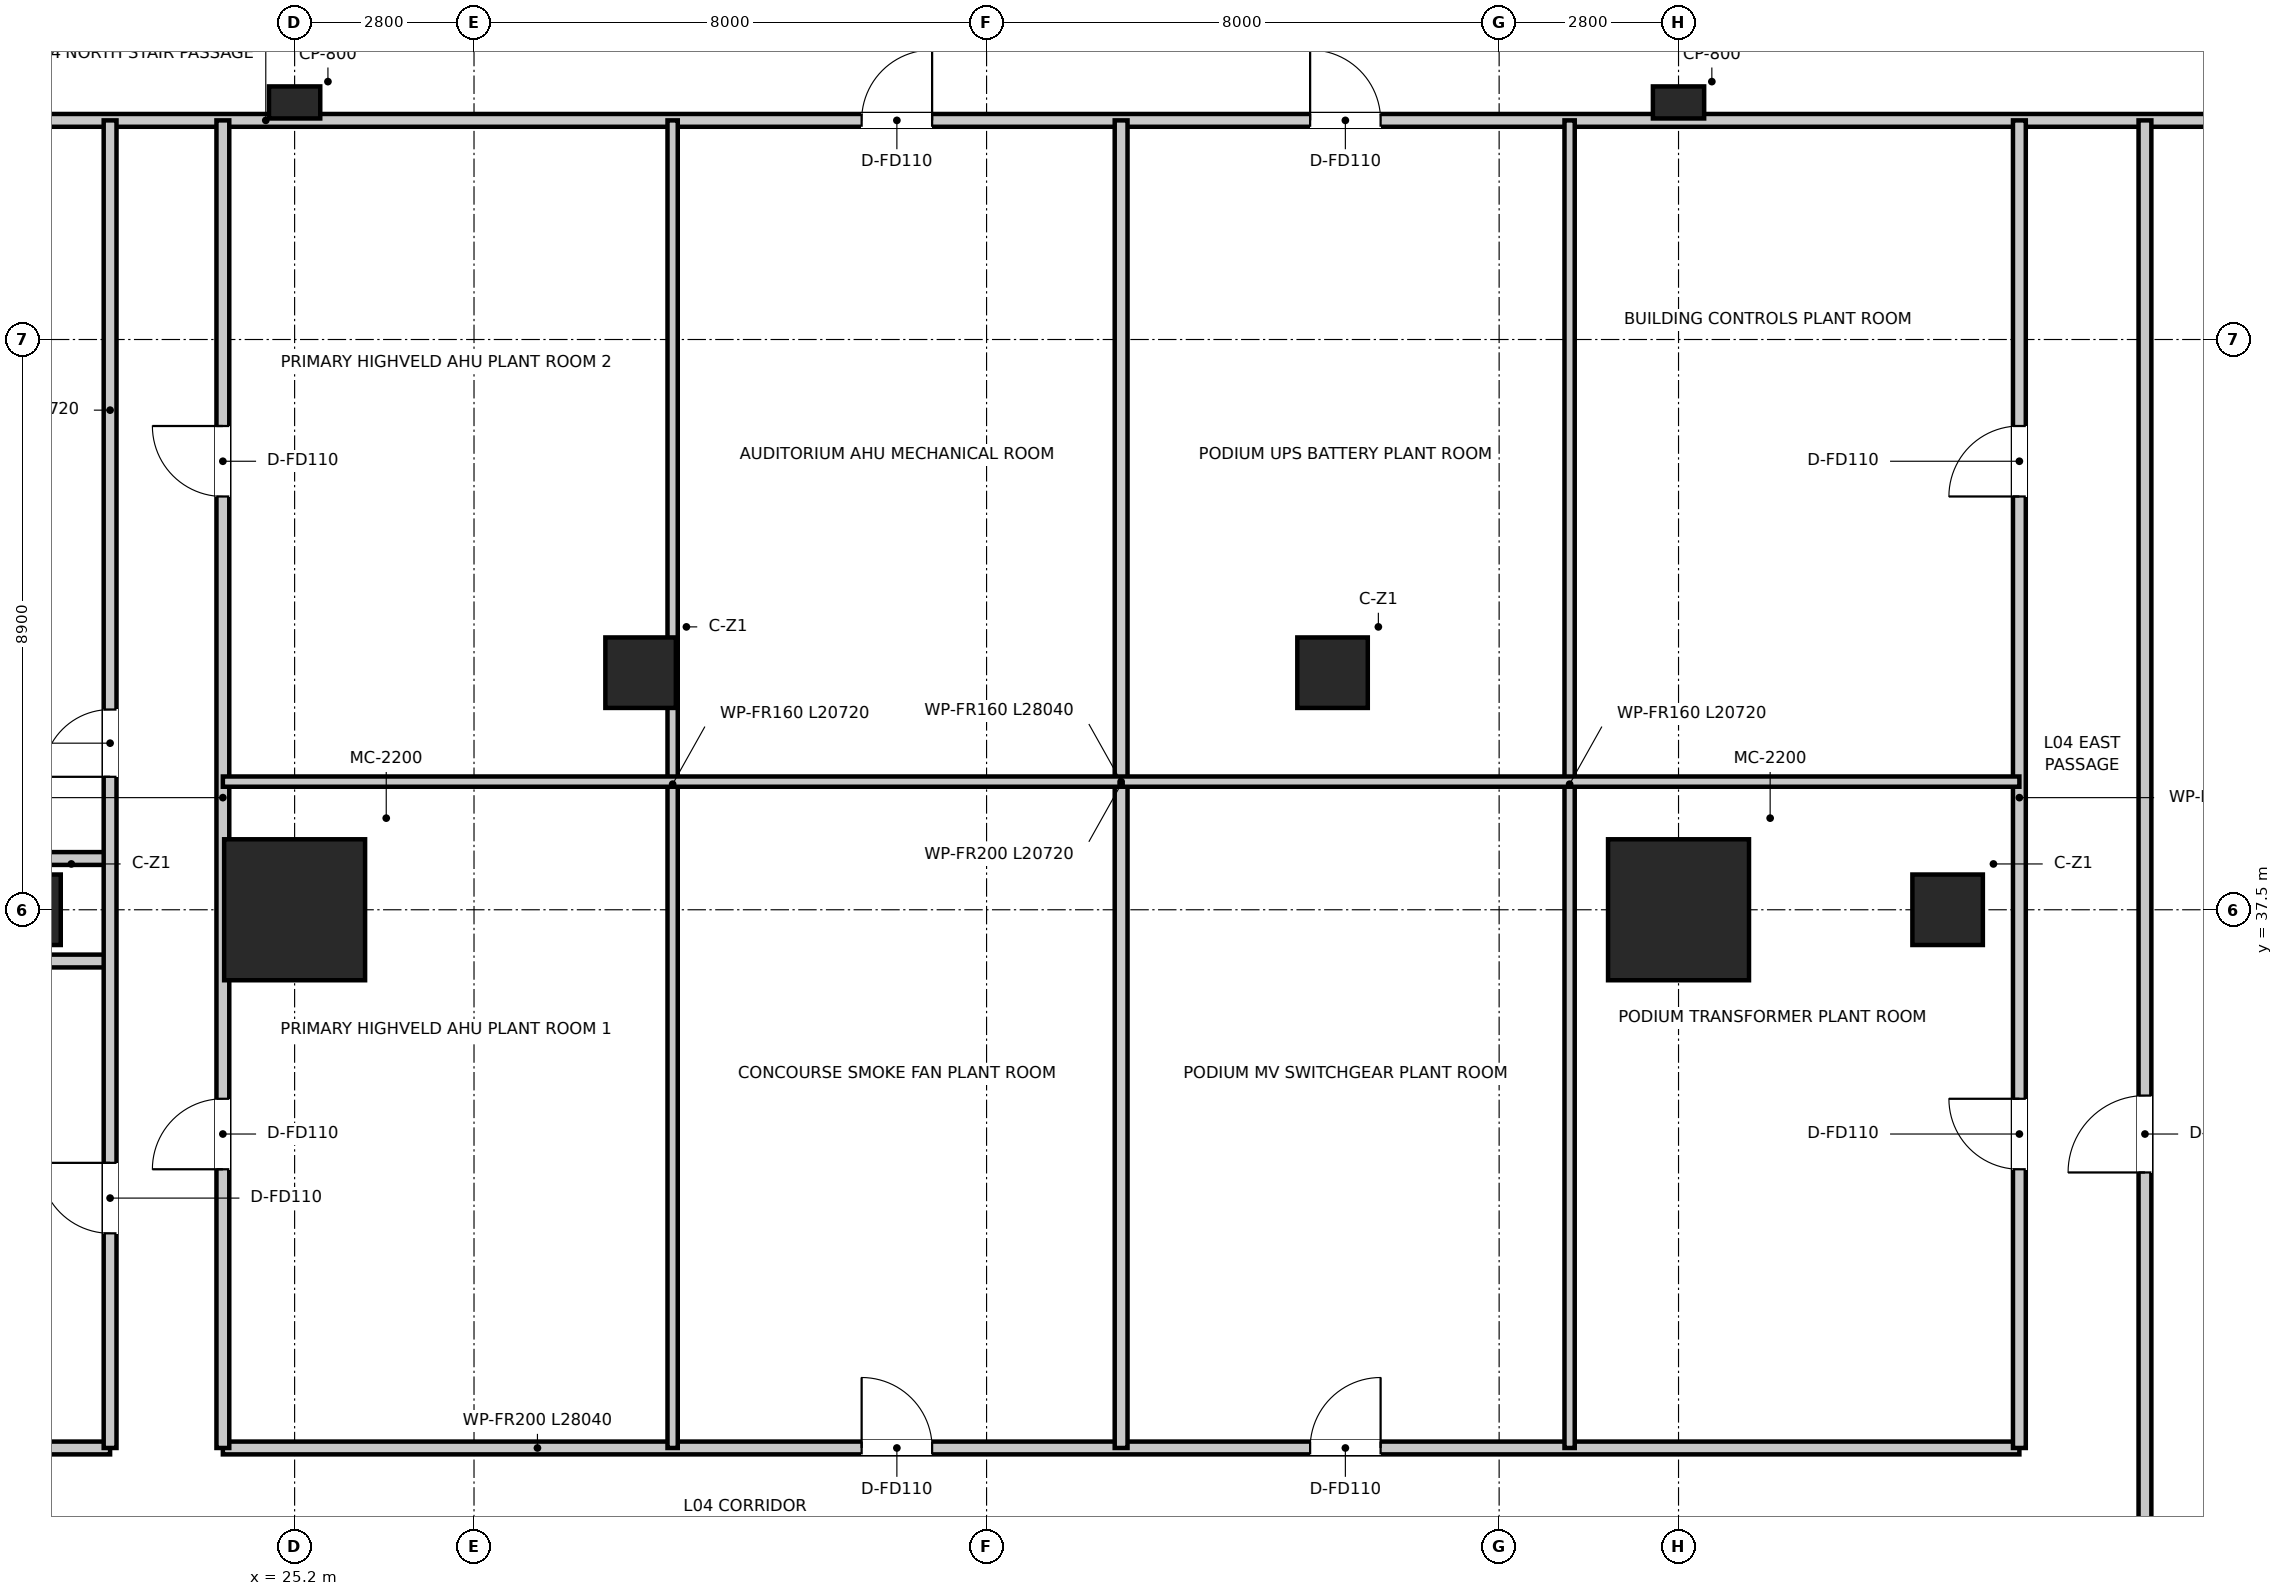
"""IFC4 building model, lengths in metres.
Left out: names, types, materials, properties, quantities, classifications, styles, units other than length and angle.
Written with IfcOpenShell. Run it as: python <this file> out.ifc"""

import sys

from ifc_helpers import new_model, si_unit, direction, frame, frame_2d, origin, origin_2d, place, context, subcontext, project, spatial, rectangle, extrude, source, transform, mapped, element, fill, save


model = new_model("IFC4")
c1 = context("Model", 3, precision=1e-05, world=origin(), true_north=direction((0.0, 1.0)))
c2 = subcontext(c1, "Body", "Model", "MODEL_VIEW")
j1 = project(units=[si_unit("LENGTHUNIT", "METRE"), si_unit("PLANEANGLEUNIT", "RADIAN")], contexts=[c1])
p1 = place(None, origin())
s1 = spatial("IfcSite", under=j1, at=p1, CompositionType="ELEMENT")
p2 = place(p1, origin())
s2 = spatial("IfcBuilding", under=s1, at=p2, CompositionType="ELEMENT")
p3 = place(p2, frame((0.0, 0.0, 20.0)))
s3 = spatial("IfcBuildingStorey", under=s2, at=p3, CompositionType="ELEMENT", Elevation=20.0)
m1 = source(origin(), c2, "Body", "SweptSolid", [
    extrude(rectangle(XDim=2.2, YDim=2.2, at=origin_2d()), origin(), (0.0, 0.0, 1.0), 5.0),
])
for number, where, z_axis, x_axis in (
    (1, (46.8, 37.5, 0.0), (0.0, 0.0, 1.0), (1.0, 0.0, 0.0)),
    (2, (25.2, 37.5, 0.0), (0.0, 0.0, 1.0), (1.0, 0.0, 0.0)),
):
    element("IfcColumn", number, at=place(p3, frame(where, z_axis=z_axis, x_axis=x_axis)), inside=s3, PredefinedType="USERDEFINED", context=c2, shape_type="MappedRepresentation", body=[
        mapped(m1, transform((0.0, 0.0, 0.0), x_axis=(1.0, 0.0, 0.0), y_axis=(0.0, 1.0, 0.0), z_axis=(0.0, 0.0, 1.0), scale=1.0)),
    ])
m2 = source(origin(), c2, "Body", "SweptSolid", [
    extrude(rectangle(XDim=1.1, YDim=1.1, at=origin_2d()), origin(), (0.0, 0.0, 1.0), 5.0),
])
for number, where, z_axis, x_axis in (
    (3, (21.0, 37.5, 0.0), (0.0, 0.0, 1.0), (1.0, 0.0, 0.0)),
    (4, (30.6, 41.2, 0.0), (0.0, 0.0, 1.0), (1.0, 0.0, 0.0)),
    (5, (41.4, 41.2, 0.0), (0.0, 0.0, 1.0), (1.0, 0.0, 0.0)),
    (6, (51.0, 37.5, 0.0), (0.0, 0.0, 1.0), (1.0, 0.0, 0.0)),
):
    element("IfcColumn", number, at=place(p3, frame(where, z_axis=z_axis, x_axis=x_axis)), inside=s3, PredefinedType="COLUMN", context=c2, shape_type="MappedRepresentation", body=[
        mapped(m2, transform((0.0, 0.0, 0.0), x_axis=(1.0, 0.0, 0.0), y_axis=(0.0, 1.0, 0.0), z_axis=(0.0, 0.0, 1.0), scale=1.0)),
    ])
m3 = source(origin(), c2, "Body", "SweptSolid", [
    extrude(rectangle(XDim=0.8, YDim=0.5, at=origin_2d()), origin(), (0.0, 0.0, 1.0), 5.0),
])
for number, where, z_axis, x_axis in (
    (7, (25.2, 50.1, 0.0), (0.0, 0.0, 1.0), (1.0, 0.0, 0.0)),
    (8, (46.8, 50.1, 0.0), (0.0, 0.0, 1.0), (1.0, 0.0, 0.0)),
):
    element("IfcColumn", number, at=place(p3, frame(where, z_axis=z_axis, x_axis=x_axis)), inside=s3, PredefinedType="PILASTER", context=c2, shape_type="MappedRepresentation", body=[
        mapped(m3, transform((0.0, 0.0, 0.0), x_axis=(1.0, 0.0, 0.0), y_axis=(0.0, 1.0, 0.0), z_axis=(0.0, 0.0, 1.0), scale=1.0)),
    ])
p4 = place(p3, frame((11.305, 36.7, 0.0), z_axis=(0.0, 0.0, 1.0), x_axis=(1.0, 0.0, 0.0)))
e9 = element("IfcWall", 9, at=p4, inside=s3, PredefinedType="PARTITIONING", context=c2, shape_type="SweptSolid", body=[
    extrude(rectangle(XDim=11.015, YDim=0.2, at=frame_2d((5.508, 0.0))), origin(), (0.0, 0.0, 1.0), 2.92),
])
p5 = place(p3, frame((11.305, 38.3, 0.0), z_axis=(0.0, 0.0, 1.0), x_axis=(1.0, 0.0, 0.0)))
e10 = element("IfcWall", 10, at=p5, inside=s3, PredefinedType="PARTITIONING", context=c2, shape_type="SweptSolid", body=[
    extrude(rectangle(XDim=11.015, YDim=0.2, at=frame_2d((5.508, 0.0))), origin(), (0.0, 0.0, 1.0), 4.03),
])
p6 = place(p3, frame((17.9, 29.1, 0.0), z_axis=(0.0, 0.0, 1.0), x_axis=(1.0, 0.0, 0.0)))
e11 = element("IfcWall", 11, at=p6, inside=s3, PredefinedType="PARTITIONING", context=c2, shape_type="SweptSolid", body=[
    extrude(rectangle(XDim=4.42, YDim=0.2, at=frame_2d((2.21, 0.0))), origin(), (0.0, 0.0, 1.0), 4.03),
])
p7 = place(p3, frame((24.08, 29.1, 0.0), z_axis=(0.0, 0.0, 1.0), x_axis=(1.0, 0.0, 0.0)))
e12 = element("IfcWall", 12, at=p7, inside=s3, PredefinedType="PARTITIONING", context=c2, shape_type="SweptSolid", body=[
    extrude(rectangle(XDim=28.04, YDim=0.2, at=frame_2d((14.02, 0.0))), origin(), (0.0, 0.0, 1.0), 3.92),
])
p8 = place(p7, frame((9.97, 0.0, 0.0)))
e13 = element("IfcOpeningElement", 13, at=p8, cuts=e12, PredefinedType="OPENING", context=c2, shape_type="SweptSolid", body=[
    extrude(rectangle(XDim=1.1, YDim=2.15, at=frame_2d((0.55, 1.075))), frame((0.0, 0.11, 0.0), z_axis=(0.0, -1.0, 0.0), x_axis=(1.0, 0.0, 0.0)), (0.0, 0.0, 1.0), 0.22),
])
p9 = place(p7, frame((16.97, 0.0, 0.0)))
e14 = element("IfcOpeningElement", 14, at=p9, cuts=e12, PredefinedType="OPENING", context=c2, shape_type="SweptSolid", body=[
    extrude(rectangle(XDim=1.1, YDim=2.15, at=frame_2d((0.55, 1.075))), frame((0.0, 0.11, 0.0), z_axis=(0.0, -1.0, 0.0), x_axis=(1.0, 0.0, 0.0)), (0.0, 0.0, 1.0), 0.22),
])
p10 = place(p3, frame((15.6, 49.82, 0.0), z_axis=(0.0, 0.0, 1.0), x_axis=(1.0, 0.0, 0.0)))
e15 = element("IfcWall", 15, at=p10, inside=s3, PredefinedType="PARTITIONING", context=c2, shape_type="SweptSolid", body=[
    extrude(rectangle(XDim=40.7, YDim=0.2, at=frame_2d((20.35, 0.0))), origin(), (0.0, 0.0, 1.0), 4.03),
])
p11 = place(p10, frame((18.45, 0.0, 0.0)))
e16 = element("IfcOpeningElement", 16, at=p11, cuts=e15, PredefinedType="OPENING", context=c2, shape_type="SweptSolid", body=[
    extrude(rectangle(XDim=1.1, YDim=2.15, at=frame_2d((0.55, 1.075))), frame((0.0, 0.11, 0.0), z_axis=(0.0, -1.0, 0.0), x_axis=(1.0, 0.0, 0.0)), (0.0, 0.0, 1.0), 0.22),
])
p12 = place(p10, frame((25.45, 0.0, 0.0)))
e17 = element("IfcOpeningElement", 17, at=p12, cuts=e15, PredefinedType="OPENING", context=c2, shape_type="SweptSolid", body=[
    extrude(rectangle(XDim=1.1, YDim=2.15, at=frame_2d((0.55, 1.075))), frame((0.0, 0.11, 0.0), z_axis=(0.0, -1.0, 0.0), x_axis=(1.0, 0.0, 0.0)), (0.0, 0.0, 1.0), 0.22),
])
p13 = place(p3, frame((22.32, 29.1, 0.0), z_axis=(0.0, 0.0, 1.0), x_axis=(0.0, 1.0, 0.0)))
e18 = element("IfcWall", 18, at=p13, inside=s3, PredefinedType="PARTITIONING", context=c2, shape_type="SweptSolid", body=[
    extrude(rectangle(XDim=20.72, YDim=0.2, at=frame_2d((10.36, 0.0))), origin(), (0.0, 0.0, 1.0), 4.02),
])
p14 = place(p13, frame((3.35, 0.0, 0.0)))
e19 = element("IfcOpeningElement", 19, at=p14, cuts=e18, PredefinedType="OPENING", context=c2, shape_type="SweptSolid", body=[
    extrude(rectangle(XDim=1.1, YDim=2.15, at=frame_2d((0.55, 1.075))), frame((0.0, 0.11, 0.0), z_axis=(0.0, -1.0, 0.0), x_axis=(1.0, 0.0, 0.0)), (0.0, 0.0, 1.0), 0.22),
])
p15 = place(p13, frame((10.475, 0.0, 0.0)))
e20 = element("IfcOpeningElement", 20, at=p15, cuts=e18, PredefinedType="OPENING", context=c2, shape_type="SweptSolid", body=[
    extrude(rectangle(XDim=1.05, YDim=2.1, at=frame_2d((0.525, 1.05))), frame((0.0, 0.11, 0.0), z_axis=(0.0, -1.0, 0.0), x_axis=(1.0, 0.0, 0.0)), (0.0, 0.0, 1.0), 0.22),
])
p16 = place(p3, frame((24.08, 29.1, 0.0), z_axis=(0.0, 0.0, 1.0), x_axis=(0.0, 1.0, 0.0)))
e21 = element("IfcWall", 21, at=p16, inside=s3, PredefinedType="PARTITIONING", context=c2, shape_type="SweptSolid", body=[
    extrude(rectangle(XDim=20.72, YDim=0.2, at=frame_2d((10.36, 0.0))), origin(), (0.0, 0.0, 1.0), 4.02),
])
p17 = place(p16, frame((4.35, 0.0, 0.0)))
e22 = element("IfcOpeningElement", 22, at=p17, cuts=e21, PredefinedType="OPENING", context=c2, shape_type="SweptSolid", body=[
    extrude(rectangle(XDim=1.1, YDim=2.15, at=frame_2d((0.55, 1.075))), frame((0.0, 0.11, 0.0), z_axis=(0.0, -1.0, 0.0), x_axis=(1.0, 0.0, 0.0)), (0.0, 0.0, 1.0), 0.22),
])
p18 = place(p16, frame((14.85, 0.0, 0.0)))
e23 = element("IfcOpeningElement", 23, at=p18, cuts=e21, PredefinedType="OPENING", context=c2, shape_type="SweptSolid", body=[
    extrude(rectangle(XDim=1.1, YDim=2.15, at=frame_2d((0.55, 1.075))), frame((0.0, 0.11, 0.0), z_axis=(0.0, -1.0, 0.0), x_axis=(1.0, 0.0, 0.0)), (0.0, 0.0, 1.0), 0.22),
])
p19 = place(p3, frame((52.12, 29.1, 0.0), z_axis=(0.0, 0.0, 1.0), x_axis=(0.0, 1.0, 0.0)))
e24 = element("IfcWall", 24, at=p19, inside=s3, PredefinedType="PARTITIONING", context=c2, shape_type="SweptSolid", body=[
    extrude(rectangle(XDim=20.72, YDim=0.2, at=frame_2d((10.36, 0.0))), origin(), (0.0, 0.0, 1.0), 4.08),
])
p20 = place(p19, frame((4.35, 0.0, 0.0)))
e25 = element("IfcOpeningElement", 25, at=p20, cuts=e24, PredefinedType="OPENING", context=c2, shape_type="SweptSolid", body=[
    extrude(rectangle(XDim=1.1, YDim=2.15, at=frame_2d((0.55, 1.075))), frame((0.0, 0.11, 0.0), z_axis=(0.0, -1.0, 0.0), x_axis=(1.0, 0.0, 0.0)), (0.0, 0.0, 1.0), 0.22),
])
p21 = place(p19, frame((14.85, 0.0, 0.0)))
e26 = element("IfcOpeningElement", 26, at=p21, cuts=e24, PredefinedType="OPENING", context=c2, shape_type="SweptSolid", body=[
    extrude(rectangle(XDim=1.1, YDim=2.15, at=frame_2d((0.55, 1.075))), frame((0.0, 0.11, 0.0), z_axis=(0.0, -1.0, 0.0), x_axis=(1.0, 0.0, 0.0)), (0.0, 0.0, 1.0), 0.22),
])
p22 = place(p3, frame((54.08, 0.605, 0.0), z_axis=(0.0, 0.0, 1.0), x_axis=(0.0, 1.0, 0.0)))
e27 = element("IfcWall", 27, at=p22, inside=s3, PredefinedType="PARTITIONING", context=c2, shape_type="SweptSolid", body=[
    extrude(rectangle(XDim=49.215, YDim=0.2, at=frame_2d((24.607, 0.0))), origin(), (0.0, 0.0, 1.0), 4.08),
])
p23 = place(p22, frame((32.795, 0.0, 0.0)))
e28 = element("IfcOpeningElement", 28, at=p23, cuts=e27, PredefinedType="OPENING", context=c2, shape_type="SweptSolid", body=[
    extrude(rectangle(XDim=1.2, YDim=2.15, at=frame_2d((0.6, 1.075))), frame((0.0, 0.11, 0.0), z_axis=(0.0, -1.0, 0.0), x_axis=(1.0, 0.0, 0.0)), (0.0, 0.0, 1.0), 0.22),
])
p24 = place(p3, frame((31.1, 29.1, 0.0), z_axis=(0.0, 0.0, 1.0), x_axis=(0.0, 1.0, 0.0)))
e29 = element("IfcWall", 29, at=p24, inside=s3, PredefinedType="PARTITIONING", context=c2, shape_type="SweptSolid", body=[
    extrude(rectangle(XDim=20.72, YDim=0.16, at=frame_2d((10.36, 0.0))), origin(), (0.0, 0.0, 1.0), 3.92),
])
p25 = place(p3, frame((38.1, 29.1, 0.0), z_axis=(0.0, 0.0, 1.0), x_axis=(0.0, 1.0, 0.0)))
e30 = element("IfcWall", 30, at=p25, inside=s3, PredefinedType="PARTITIONING", context=c2, shape_type="SweptSolid", body=[
    extrude(rectangle(XDim=20.72, YDim=0.2, at=frame_2d((10.36, 0.0))), origin(), (0.0, 0.0, 1.0), 3.92),
])
p26 = place(p3, frame((45.1, 29.1, 0.0), z_axis=(0.0, 0.0, 1.0), x_axis=(0.0, 1.0, 0.0)))
e31 = element("IfcWall", 31, at=p26, inside=s3, PredefinedType="PARTITIONING", context=c2, shape_type="SweptSolid", body=[
    extrude(rectangle(XDim=20.72, YDim=0.16, at=frame_2d((10.36, 0.0))), origin(), (0.0, 0.0, 1.0), 3.92),
])
p27 = place(p3, frame((24.08, 39.5, 0.0), z_axis=(0.0, 0.0, 1.0), x_axis=(1.0, 0.0, 0.0)))
e32 = element("IfcWall", 32, at=p27, inside=s3, PredefinedType="PARTITIONING", context=c2, shape_type="SweptSolid", body=[
    extrude(rectangle(XDim=28.04, YDim=0.16, at=frame_2d((14.02, 0.0))), origin(), (0.0, 0.0, 1.0), 4.03),
])
p28 = place(p14, origin())
e33 = element("IfcDoor", 33, at=p28, inside=s3, OperationType="SINGLE_SWING_RIGHT", PredefinedType="DOOR", context=c2, shape_type="SweptSolid", body=[
    extrude(rectangle(XDim=1.1, YDim=2.15, at=frame_2d((0.55, 1.075))), frame((0.0, 0.025, 0.0), z_axis=(0.0, -1.0, 0.0), x_axis=(1.0, 0.0, 0.0)), (0.0, 0.0, 1.0), 0.05),
])
fill(e19, e33)
p29 = place(p15, origin())
e34 = element("IfcDoor", 34, at=p29, inside=s3, OperationType="SINGLE_SWING_LEFT", PredefinedType="DOOR", context=c2, shape_type="SweptSolid", body=[
    extrude(rectangle(XDim=1.05, YDim=2.1, at=frame_2d((0.525, 1.05))), frame((0.0, 0.025, 0.0), z_axis=(0.0, -1.0, 0.0), x_axis=(1.0, 0.0, 0.0)), (0.0, 0.0, 1.0), 0.05),
])
fill(e20, e34)
p30 = place(p23, origin())
e35 = element("IfcDoor", 35, at=p30, inside=s3, OperationType="SINGLE_SWING_LEFT", PredefinedType="DOOR", context=c2, shape_type="SweptSolid", body=[
    extrude(rectangle(XDim=1.2, YDim=2.15, at=frame_2d((0.6, 1.075))), frame((0.0, 0.025, 0.0), z_axis=(0.0, -1.0, 0.0), x_axis=(1.0, 0.0, 0.0)), (0.0, 0.0, 1.0), 0.05),
])
fill(e28, e35)
p31 = place(p17, origin())
e36 = element("IfcDoor", 36, at=p31, inside=s3, OperationType="SINGLE_SWING_LEFT", PredefinedType="DOOR", context=c2, shape_type="SweptSolid", body=[
    extrude(rectangle(XDim=1.1, YDim=2.15, at=frame_2d((0.55, 1.075))), frame((0.0, 0.025, 0.0), z_axis=(0.0, -1.0, 0.0), x_axis=(1.0, 0.0, 0.0)), (0.0, 0.0, 1.0), 0.05),
])
fill(e22, e36)
p32 = place(p18, origin())
e37 = element("IfcDoor", 37, at=p32, inside=s3, OperationType="SINGLE_SWING_RIGHT", PredefinedType="DOOR", context=c2, shape_type="SweptSolid", body=[
    extrude(rectangle(XDim=1.1, YDim=2.15, at=frame_2d((0.55, 1.075))), frame((0.0, 0.025, 0.0), z_axis=(0.0, -1.0, 0.0), x_axis=(1.0, 0.0, 0.0)), (0.0, 0.0, 1.0), 0.05),
])
fill(e23, e37)
p33 = place(p8, origin())
e38 = element("IfcDoor", 38, at=p33, inside=s3, OperationType="SINGLE_SWING_LEFT", PredefinedType="DOOR", context=c2, shape_type="SweptSolid", body=[
    extrude(rectangle(XDim=1.1, YDim=2.15, at=frame_2d((0.55, 1.075))), frame((0.0, 0.025, 0.0), z_axis=(0.0, -1.0, 0.0), x_axis=(1.0, 0.0, 0.0)), (0.0, 0.0, 1.0), 0.05),
])
fill(e13, e38)
p34 = place(p11, origin())
e39 = element("IfcDoor", 39, at=p34, inside=s3, OperationType="SINGLE_SWING_RIGHT", PredefinedType="DOOR", context=c2, shape_type="SweptSolid", body=[
    extrude(rectangle(XDim=1.1, YDim=2.15, at=frame_2d((0.55, 1.075))), frame((0.0, 0.025, 0.0), z_axis=(0.0, -1.0, 0.0), x_axis=(1.0, 0.0, 0.0)), (0.0, 0.0, 1.0), 0.05),
])
fill(e16, e39)
p35 = place(p9, origin())
e40 = element("IfcDoor", 40, at=p35, inside=s3, OperationType="SINGLE_SWING_RIGHT", PredefinedType="DOOR", context=c2, shape_type="SweptSolid", body=[
    extrude(rectangle(XDim=1.1, YDim=2.15, at=frame_2d((0.55, 1.075))), frame((0.0, 0.025, 0.0), z_axis=(0.0, -1.0, 0.0), x_axis=(1.0, 0.0, 0.0)), (0.0, 0.0, 1.0), 0.05),
])
fill(e14, e40)
p36 = place(p12, origin())
e41 = element("IfcDoor", 41, at=p36, inside=s3, OperationType="SINGLE_SWING_LEFT", PredefinedType="DOOR", context=c2, shape_type="SweptSolid", body=[
    extrude(rectangle(XDim=1.1, YDim=2.15, at=frame_2d((0.55, 1.075))), frame((0.0, 0.025, 0.0), z_axis=(0.0, -1.0, 0.0), x_axis=(1.0, 0.0, 0.0)), (0.0, 0.0, 1.0), 0.05),
])
fill(e17, e41)
p37 = place(p20, origin())
e42 = element("IfcDoor", 42, at=p37, inside=s3, OperationType="SINGLE_SWING_RIGHT", PredefinedType="DOOR", context=c2, shape_type="SweptSolid", body=[
    extrude(rectangle(XDim=1.1, YDim=2.15, at=frame_2d((0.55, 1.075))), frame((0.0, 0.025, 0.0), z_axis=(0.0, -1.0, 0.0), x_axis=(1.0, 0.0, 0.0)), (0.0, 0.0, 1.0), 0.05),
])
fill(e25, e42)
p38 = place(p21, origin())
e43 = element("IfcDoor", 43, at=p38, inside=s3, OperationType="SINGLE_SWING_LEFT", PredefinedType="DOOR", context=c2, shape_type="SweptSolid", body=[
    extrude(rectangle(XDim=1.1, YDim=2.15, at=frame_2d((0.55, 1.075))), frame((0.0, 0.025, 0.0), z_axis=(0.0, -1.0, 0.0), x_axis=(1.0, 0.0, 0.0)), (0.0, 0.0, 1.0), 0.05),
])
fill(e26, e43)
save(model, sys.argv[1])
